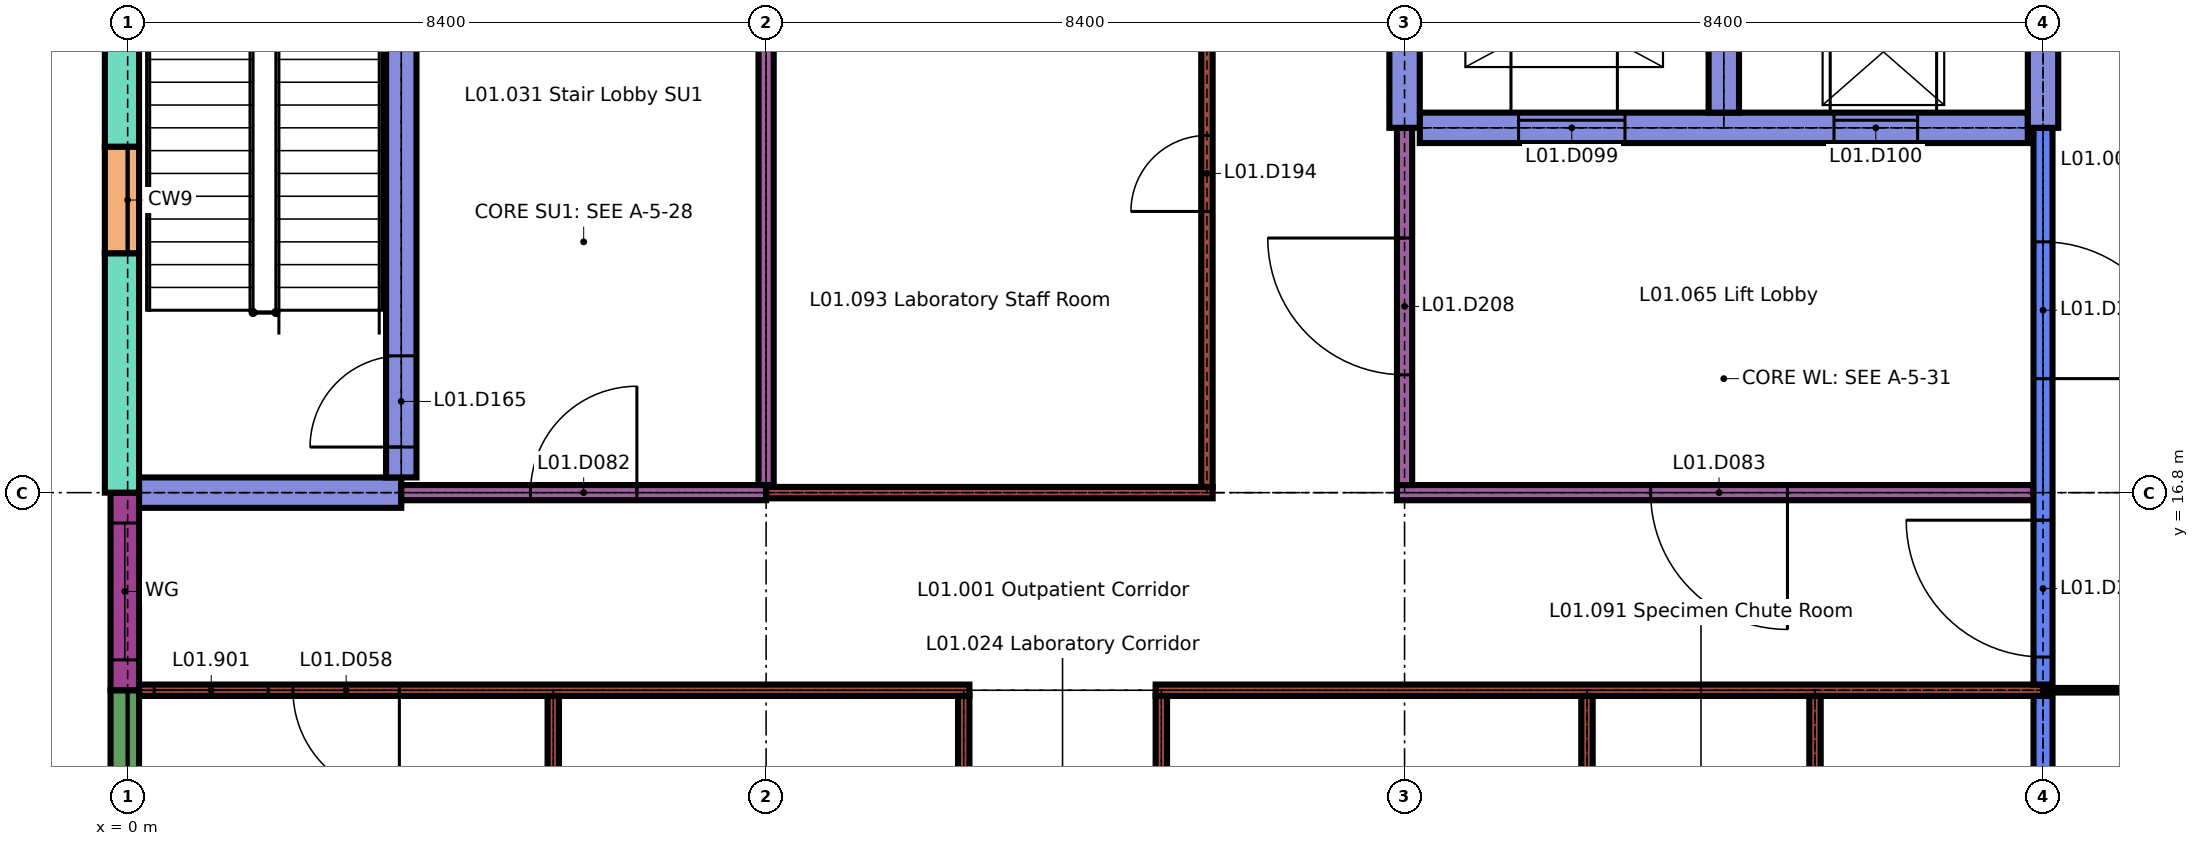
"""IFC4 building model, lengths in metres.
Left out: names, types, materials, properties, quantities, classifications, styles, units other than length and angle.
Written with IfcOpenShell. Run it as: python <this file> out.ifc"""

import sys

from ifc_helpers import new_model, si_unit, direction, frame, frame_2d, origin, place, context, subcontext, project, spatial, rectangle, extrude, element, fill, save


model = new_model("IFC4")
c1 = context("Model", 3, precision=1e-05, world=origin(), true_north=direction((0.0, 1.0)))
c2 = subcontext(c1, "Body", "Model", "MODEL_VIEW")
j1 = project(units=[si_unit("LENGTHUNIT", "METRE"), si_unit("PLANEANGLEUNIT", "RADIAN")], contexts=[c1])
p1 = place(None, origin())
s1 = spatial("IfcSite", under=j1, at=p1, CompositionType="ELEMENT")
p2 = place(p1, origin())
s2 = spatial("IfcBuilding", under=s1, at=p2, CompositionType="ELEMENT")
p3 = place(p2, frame((0.0, 0.0, 4.5)))
s3 = spatial("IfcBuildingStorey", under=s2, at=p3, CompositionType="ELEMENT", Elevation=4.5)
p4 = place(p3, frame((-0.038, 8.825, 0.0), z_axis=(0.0, 0.0, 1.0), x_axis=(0.0, 1.0, 0.0)))
e1 = element("IfcWall", 1, at=p4, inside=s3, PredefinedType="SOLIDWALL", context=c2, shape_type="SweptSolid", body=[
    extrude(rectangle(XDim=5.375, YDim=0.375, at=frame_2d((2.688, 0.0))), origin(), (0.0, 0.0, 1.0), 0.45),
])
p5 = place(p3, frame((-0.038, 14.2, 0.0), z_axis=(0.0, 0.0, 1.0), x_axis=(0.0, 1.0, 0.0)))
e2 = element("IfcWall", 2, at=p5, inside=s3, PredefinedType="SOLIDWALL", context=c2, shape_type="SweptSolid", body=[
    extrude(rectangle(XDim=2.6, YDim=0.375, at=frame_2d((1.3, 0.0))), origin(), (0.0, 0.0, 1.0), 3.15),
])
p6 = place(p5, frame((0.4, 0.0, 0.9)))
e3 = element("IfcOpeningElement", 3, at=p6, cuts=e2, PredefinedType="OPENING", context=c2, shape_type="SweptSolid", body=[
    extrude(rectangle(XDim=1.8, YDim=1.5, at=frame_2d((0.9, 0.75))), frame((0.0, 0.198, 0.0), z_axis=(0.0, -1.0, 0.0), x_axis=(1.0, 0.0, 0.0)), (0.0, 0.0, 1.0), 0.395),
])
p7 = place(p3, frame((-0.075, 16.8, 0.0), z_axis=(0.0, 0.0, 1.0), x_axis=(0.0, 1.0, 0.0)))
e4 = element("IfcWall", 4, at=p7, inside=s3, PredefinedType="SOLIDWALL", context=c2, shape_type="SweptSolid", body=[
    extrude(rectangle(XDim=3.15, YDim=0.45, at=frame_2d((1.575, 0.0))), origin(), (0.0, 0.0, 1.0), 3.45),
])
p8 = place(p3, frame((-0.075, 21.35, 0.0), z_axis=(0.0, 0.0, 1.0), x_axis=(0.0, 1.0, 0.0)))
e5 = element("IfcWall", 5, at=p8, inside=s3, PredefinedType="SOLIDWALL", context=c2, shape_type="SweptSolid", body=[
    extrude(rectangle(XDim=3.85, YDim=0.45, at=frame_2d((1.925, 0.0))), origin(), (0.0, 0.0, 1.0), 3.45),
])
p9 = place(p3, frame((-0.075, 19.95, 0.0), z_axis=(0.0, 0.0, 1.0), x_axis=(0.0, 1.0, 0.0)))
e6 = element("IfcWall", 6, at=p9, inside=s3, PredefinedType="SOLIDWALL", context=c2, shape_type="SweptSolid", body=[
    extrude(rectangle(XDim=1.4, YDim=0.45, at=frame_2d((0.7, 0.0))), origin(), (0.0, 0.0, 1.0), 0.6),
])
p10 = place(p3, frame((0.15, 14.2, 0.0), z_axis=(0.0, 0.0, 1.0), x_axis=(1.0, 0.0, 0.0)))
e7 = element("IfcWall", 7, at=p10, inside=s3, PredefinedType="PARTITIONING", context=c2, shape_type="SweptSolid", body=[
    extrude(rectangle(XDim=10.925, YDim=0.15, at=frame_2d((5.462, 0.0))), origin(), (0.0, 0.0, 1.0), 3.45),
])
p11 = place(p10, frame((2.025, 0.0, 0.0)))
e8 = element("IfcOpeningElement", 8, at=p11, cuts=e7, PredefinedType="OPENING", context=c2, shape_type="SweptSolid", body=[
    extrude(rectangle(XDim=1.4, YDim=2.1, at=frame_2d((0.7, 1.05))), frame((0.0, 0.085, 0.0), z_axis=(0.0, -1.0, 0.0), x_axis=(1.0, 0.0, 0.0)), (0.0, 0.0, 1.0), 0.17),
])
p12 = place(p10, frame((0.2, 0.0, 0.9)))
e9 = element("IfcOpeningElement", 9, at=p12, cuts=e7, PredefinedType="OPENING", context=c2, shape_type="SweptSolid", body=[
    extrude(rectangle(XDim=1.5, YDim=1.0, at=frame_2d((0.75, 0.5))), frame((0.0, 0.085, 0.0), z_axis=(0.0, -1.0, 0.0), x_axis=(1.0, 0.0, 0.0)), (0.0, 0.0, 1.0), 0.17),
])
p13 = place(p3, frame((13.525, 14.2, 0.0), z_axis=(0.0, 0.0, 1.0), x_axis=(1.0, 0.0, 0.0)))
e10 = element("IfcWall", 10, at=p13, inside=s3, PredefinedType="PARTITIONING", context=c2, shape_type="SweptSolid", body=[
    extrude(rectangle(XDim=11.675, YDim=0.15, at=frame_2d((5.837, 0.0))), origin(), (0.0, 0.0, 1.0), 3.45),
])
p14 = place(p3, frame((25.2, 14.2, 0.0), z_axis=(0.0, 0.0, 1.0), x_axis=(1.0, 0.0, 0.0)))
e11 = element("IfcWall", 11, at=p14, inside=s3, PredefinedType="PARTITIONING", context=c2, shape_type="SweptSolid", body=[
    extrude(rectangle(XDim=8.4, YDim=0.06, at=frame_2d((4.2, 0.0))), origin(), (0.0, 0.0, 1.0), 3.45),
])
p15 = place(p14, frame((3.5, 0.0, 0.0)))
e12 = element("IfcOpeningElement", 12, at=p15, cuts=e11, PredefinedType="OPENING", context=c2, shape_type="SweptSolid", body=[
    extrude(rectangle(XDim=1.4, YDim=2.1, at=frame_2d((0.7, 1.05))), frame((0.0, 0.04, 0.0), z_axis=(0.0, -1.0, 0.0), x_axis=(1.0, 0.0, 0.0)), (0.0, 0.0, 1.0), 0.08),
])
p16 = place(p14, frame((1.4, 0.0, 0.9)))
e13 = element("IfcOpeningElement", 13, at=p16, cuts=e11, PredefinedType="OPENING", context=c2, shape_type="SweptSolid", body=[
    extrude(rectangle(XDim=1.8, YDim=1.0, at=frame_2d((0.9, 0.5))), frame((0.0, 0.04, 0.0), z_axis=(0.0, -1.0, 0.0), x_axis=(1.0, 0.0, 0.0)), (0.0, 0.0, 1.0), 0.08),
])
p17 = place(p3, frame((0.15, 16.8, 0.0), z_axis=(0.0, 0.0, 1.0), x_axis=(1.0, 0.0, 0.0)))
e14 = element("IfcWall", 14, at=p17, inside=s3, PredefinedType="SHEAR", context=c2, shape_type="SweptSolid", body=[
    extrude(rectangle(XDim=3.45, YDim=0.4, at=frame_2d((1.725, 0.0))), origin(), (0.0, 0.0, 1.0), 3.45),
])
p18 = place(p3, frame((3.6, 16.8, 0.0), z_axis=(0.0, 0.0, 1.0), x_axis=(1.0, 0.0, 0.0)))
e15 = element("IfcWall", 15, at=p18, inside=s3, PredefinedType="PARTITIONING", context=c2, shape_type="SweptSolid", body=[
    extrude(rectangle(XDim=4.8, YDim=0.2, at=frame_2d((2.4, 0.0))), origin(), (0.0, 0.0, 1.0), 3.45),
])
p19 = place(p18, frame((1.7, 0.0, 0.0)))
e16 = element("IfcOpeningElement", 16, at=p19, cuts=e15, PredefinedType="OPENING", context=c2, shape_type="SweptSolid", body=[
    extrude(rectangle(XDim=1.4, YDim=2.1, at=frame_2d((0.7, 1.05))), frame((0.0, 0.11, 0.0), z_axis=(0.0, -1.0, 0.0), x_axis=(1.0, 0.0, 0.0)), (0.0, 0.0, 1.0), 0.22),
])
p20 = place(p3, frame((8.4, 16.8, 0.0), z_axis=(0.0, 0.0, 1.0), x_axis=(1.0, 0.0, 0.0)))
e17 = element("IfcWall", 17, at=p20, inside=s3, PredefinedType="PARTITIONING", context=c2, shape_type="SweptSolid", body=[
    extrude(rectangle(XDim=5.875, YDim=0.15, at=frame_2d((2.938, 0.0))), origin(), (0.0, 0.0, 1.0), 3.45),
])
p21 = place(p3, frame((16.7, 16.8, 0.0), z_axis=(0.0, 0.0, 1.0), x_axis=(1.0, 0.0, 0.0)))
e18 = element("IfcWall", 18, at=p21, inside=s3, PredefinedType="PARTITIONING", context=c2, shape_type="SweptSolid", body=[
    extrude(rectangle(XDim=8.375, YDim=0.2, at=frame_2d((4.188, 0.0))), origin(), (0.0, 0.0, 1.0), 3.45),
])
p22 = place(p21, frame((3.337, 0.0, 0.0)))
e19 = element("IfcOpeningElement", 19, at=p22, cuts=e18, PredefinedType="OPENING", context=c2, shape_type="SweptSolid", body=[
    extrude(rectangle(XDim=1.8, YDim=2.4, at=frame_2d((0.9, 1.2))), frame((0.0, 0.11, 0.0), z_axis=(0.0, -1.0, 0.0), x_axis=(1.0, 0.0, 0.0)), (0.0, 0.0, 1.0), 0.22),
])
p23 = place(p3, frame((17.0, 21.6, 0.0), z_axis=(0.0, 0.0, 1.0), x_axis=(1.0, 0.0, 0.0)))
e20 = element("IfcWall", 20, at=p23, inside=s3, PredefinedType="SHEAR", context=c2, shape_type="SweptSolid", body=[
    extrude(rectangle(XDim=8.0, YDim=0.4, at=frame_2d((4.0, 0.0))), origin(), (0.0, 0.0, 1.0), 3.45),
])
p24 = place(p23, frame((1.3, 0.0, 0.0)))
e21 = element("IfcOpeningElement", 21, at=p24, cuts=e20, PredefinedType="OPENING", context=c2, shape_type="SweptSolid", body=[
    extrude(rectangle(XDim=1.4, YDim=2.1, at=frame_2d((0.7, 1.05))), frame((0.0, 0.21, 0.0), z_axis=(0.0, -1.0, 0.0), x_axis=(1.0, 0.0, 0.0)), (0.0, 0.0, 1.0), 0.42),
])
p25 = place(p23, frame((5.45, 0.0, 0.0)))
e22 = element("IfcOpeningElement", 22, at=p25, cuts=e20, PredefinedType="OPENING", context=c2, shape_type="SweptSolid", body=[
    extrude(rectangle(XDim=1.1, YDim=2.1, at=frame_2d((0.55, 1.05))), frame((0.0, 0.21, 0.0), z_axis=(0.0, -1.0, 0.0), x_axis=(1.0, 0.0, 0.0)), (0.0, 0.0, 1.0), 0.42),
])
p26 = place(p3, frame((3.6, 17.0, 0.0), z_axis=(0.0, 0.0, 1.0), x_axis=(0.0, 1.0, 0.0)))
e23 = element("IfcWall", 23, at=p26, inside=s3, PredefinedType="SHEAR", context=c2, shape_type="SweptSolid", body=[
    extrude(rectangle(XDim=8.0, YDim=0.4, at=frame_2d((4.0, 0.0))), origin(), (0.0, 0.0, 1.0), 3.45),
])
p27 = place(p26, frame((0.4, 0.0, 0.0)))
e24 = element("IfcOpeningElement", 24, at=p27, cuts=e23, PredefinedType="OPENING", context=c2, shape_type="SweptSolid", body=[
    extrude(rectangle(XDim=1.2, YDim=2.1, at=frame_2d((0.6, 1.05))), frame((0.0, 0.21, 0.0), z_axis=(0.0, -1.0, 0.0), x_axis=(1.0, 0.0, 0.0)), (0.0, 0.0, 1.0), 0.42),
])
p28 = place(p3, frame((5.6, 8.675, 0.0), z_axis=(0.0, 0.0, 1.0), x_axis=(0.0, 1.0, 0.0)))
e25 = element("IfcWall", 25, at=p28, inside=s3, PredefinedType="PARTITIONING", context=c2, shape_type="SweptSolid", body=[
    extrude(rectangle(XDim=5.45, YDim=0.15, at=frame_2d((2.725, 0.0))), origin(), (0.0, 0.0, 1.0), 3.45),
])
p29 = place(p3, frame((8.4, 16.9, 0.0), z_axis=(0.0, 0.0, 1.0), x_axis=(0.0, 1.0, 0.0)))
e26 = element("IfcWall", 26, at=p29, inside=s3, PredefinedType="PARTITIONING", context=c2, shape_type="SweptSolid", body=[
    extrude(rectangle(XDim=8.2, YDim=0.2, at=frame_2d((4.1, 0.0))), origin(), (0.0, 0.0, 1.0), 3.45),
])
p30 = place(p3, frame((11.0, 8.675, 0.0), z_axis=(0.0, 0.0, 1.0), x_axis=(0.0, 1.0, 0.0)))
e27 = element("IfcWall", 27, at=p30, inside=s3, PredefinedType="PARTITIONING", context=c2, shape_type="SweptSolid", body=[
    extrude(rectangle(XDim=5.45, YDim=0.15, at=frame_2d((2.725, 0.0))), origin(), (0.0, 0.0, 1.0), 3.45),
])
p31 = place(p3, frame((13.6, 8.675, 0.0), z_axis=(0.0, 0.0, 1.0), x_axis=(0.0, 1.0, 0.0)))
e28 = element("IfcWall", 28, at=p31, inside=s3, PredefinedType="PARTITIONING", context=c2, shape_type="SweptSolid", body=[
    extrude(rectangle(XDim=5.45, YDim=0.15, at=frame_2d((2.725, 0.0))), origin(), (0.0, 0.0, 1.0), 3.45),
])
p32 = place(p31, frame((2.425, 0.0, 0.9)))
e29 = element("IfcOpeningElement", 29, at=p32, cuts=e28, PredefinedType="OPENING", context=c2, shape_type="SweptSolid", body=[
    extrude(rectangle(XDim=0.6, YDim=0.6, at=frame_2d((0.3, 0.3))), frame((0.0, 0.085, 0.0), z_axis=(0.0, -1.0, 0.0), x_axis=(1.0, 0.0, 0.0)), (0.0, 0.0, 1.0), 0.17),
])
p33 = place(p3, frame((14.2, 16.875, 0.0), z_axis=(0.0, 0.0, 1.0), x_axis=(0.0, 1.0, 0.0)))
e30 = element("IfcWall", 30, at=p33, inside=s3, PredefinedType="PARTITIONING", context=c2, shape_type="SweptSolid", body=[
    extrude(rectangle(XDim=8.25, YDim=0.15, at=frame_2d((4.125, 0.0))), origin(), (0.0, 0.0, 1.0), 3.45),
])
p34 = place(p33, frame((3.625, 0.0, 0.0)))
e31 = element("IfcOpeningElement", 31, at=p34, cuts=e30, PredefinedType="OPENING", context=c2, shape_type="SweptSolid", body=[
    extrude(rectangle(XDim=1.0, YDim=2.1, at=frame_2d((0.5, 1.05))), frame((0.0, 0.085, 0.0), z_axis=(0.0, -1.0, 0.0), x_axis=(1.0, 0.0, 0.0)), (0.0, 0.0, 1.0), 0.17),
])
p35 = place(p3, frame((16.8, 16.9, 0.0), z_axis=(0.0, 0.0, 1.0), x_axis=(0.0, 1.0, 0.0)))
e32 = element("IfcWall", 32, at=p35, inside=s3, PredefinedType="PARTITIONING", context=c2, shape_type="SweptSolid", body=[
    extrude(rectangle(XDim=4.7, YDim=0.2, at=frame_2d((2.35, 0.0))), origin(), (0.0, 0.0, 1.0), 3.45),
])
p36 = place(p35, frame((1.45, 0.0, 0.0)))
e33 = element("IfcOpeningElement", 33, at=p36, cuts=e32, PredefinedType="OPENING", context=c2, shape_type="SweptSolid", body=[
    extrude(rectangle(XDim=1.8, YDim=2.4, at=frame_2d((0.9, 1.2))), frame((0.0, 0.11, 0.0), z_axis=(0.0, -1.0, 0.0), x_axis=(1.0, 0.0, 0.0)), (0.0, 0.0, 1.0), 0.22),
])
p37 = place(p3, frame((16.8, 21.6, 0.0), z_axis=(0.0, 0.0, 1.0), x_axis=(0.0, 1.0, 0.0)))
e34 = element("IfcWall", 34, at=p37, inside=s3, PredefinedType="SHEAR", context=c2, shape_type="SweptSolid", body=[
    extrude(rectangle(XDim=3.6, YDim=0.4, at=frame_2d((1.8, 0.0))), origin(), (0.0, 0.0, 1.0), 3.45),
])
p38 = place(p3, frame((19.2, 8.675, 0.0), z_axis=(0.0, 0.0, 1.0), x_axis=(0.0, 1.0, 0.0)))
e35 = element("IfcWall", 35, at=p38, inside=s3, PredefinedType="PARTITIONING", context=c2, shape_type="SweptSolid", body=[
    extrude(rectangle(XDim=5.45, YDim=0.15, at=frame_2d((2.725, 0.0))), origin(), (0.0, 0.0, 1.0), 3.45),
])
p39 = place(p3, frame((21.0, 21.8, 0.0), z_axis=(0.0, 0.0, 1.0), x_axis=(0.0, 1.0, 0.0)))
e36 = element("IfcWall", 36, at=p39, inside=s3, PredefinedType="SHEAR", context=c2, shape_type="SweptSolid", body=[
    extrude(rectangle(XDim=3.2, YDim=0.4, at=frame_2d((1.6, 0.0))), origin(), (0.0, 0.0, 1.0), 3.45),
])
p40 = place(p3, frame((22.2, 8.675, 0.0), z_axis=(0.0, 0.0, 1.0), x_axis=(0.0, 1.0, 0.0)))
e37 = element("IfcWall", 37, at=p40, inside=s3, PredefinedType="PARTITIONING", context=c2, shape_type="SweptSolid", body=[
    extrude(rectangle(XDim=5.45, YDim=0.15, at=frame_2d((2.725, 0.0))), origin(), (0.0, 0.0, 1.0), 3.45),
])
p41 = place(p3, frame((25.2, 8.825, 0.0), z_axis=(0.0, 0.0, 1.0), x_axis=(0.0, 1.0, 0.0)))
e38 = element("IfcWall", 38, at=p41, inside=s3, PredefinedType="SOLIDWALL", context=c2, shape_type="SweptSolid", body=[
    extrude(rectangle(XDim=5.3, YDim=0.25, at=frame_2d((2.65, 0.0))), origin(), (0.0, 0.0, 1.0), 3.45),
])
p42 = place(p3, frame((25.2, 14.275, 0.0), z_axis=(0.0, 0.0, 1.0), x_axis=(0.0, 1.0, 0.0)))
e39 = element("IfcWall", 39, at=p42, inside=s3, PredefinedType="SOLIDWALL", context=c2, shape_type="SweptSolid", body=[
    extrude(rectangle(XDim=7.325, YDim=0.25, at=frame_2d((3.663, 0.0))), origin(), (0.0, 0.0, 1.0), 3.45),
])
p43 = place(p42, frame((0.363, 0.0, 0.0)))
e40 = element("IfcOpeningElement", 40, at=p43, cuts=e39, PredefinedType="OPENING", context=c2, shape_type="SweptSolid", body=[
    extrude(rectangle(XDim=1.8, YDim=2.4, at=frame_2d((0.9, 1.2))), frame((0.0, 0.135, 0.0), z_axis=(0.0, -1.0, 0.0), x_axis=(1.0, 0.0, 0.0)), (0.0, 0.0, 1.0), 0.27),
])
p44 = place(p42, frame((4.025, 0.0, 0.0)))
e41 = element("IfcOpeningElement", 41, at=p44, cuts=e39, PredefinedType="OPENING", context=c2, shape_type="SweptSolid", body=[
    extrude(rectangle(XDim=1.8, YDim=2.4, at=frame_2d((0.9, 1.2))), frame((0.0, 0.135, 0.0), z_axis=(0.0, -1.0, 0.0), x_axis=(1.0, 0.0, 0.0)), (0.0, 0.0, 1.0), 0.27),
])
p45 = place(p3, frame((25.2, 21.6, 0.0), z_axis=(0.0, 0.0, 1.0), x_axis=(0.0, 1.0, 0.0)))
e42 = element("IfcWall", 42, at=p45, inside=s3, PredefinedType="SHEAR", context=c2, shape_type="SweptSolid", body=[
    extrude(rectangle(XDim=3.6, YDim=0.4, at=frame_2d((1.8, 0.0))), origin(), (0.0, 0.0, 1.0), 3.45),
])
p46 = place(p6, origin())
e43 = element("IfcWindow", 43, at=p46, inside=s3, PartitioningType="DOUBLE_PANEL_VERTICAL", PredefinedType="WINDOW", context=c2, shape_type="SweptSolid", body=[
    extrude(rectangle(XDim=1.8, YDim=1.5, at=frame_2d((0.9, 0.75))), frame((0.0, 0.03, 0.0), z_axis=(0.0, -1.0, 0.0), x_axis=(1.0, 0.0, 0.0)), (0.0, 0.0, 1.0), 0.06),
])
fill(e3, e43)
p47 = place(p11, origin())
e44 = element("IfcDoor", 44, at=p47, inside=s3, OperationType="SINGLE_SWING_RIGHT", PredefinedType="DOOR", context=c2, shape_type="SweptSolid", body=[
    extrude(rectangle(XDim=1.4, YDim=2.1, at=frame_2d((0.7, 1.05))), frame((0.0, 0.025, 0.0), z_axis=(0.0, -1.0, 0.0), x_axis=(1.0, 0.0, 0.0)), (0.0, 0.0, 1.0), 0.05),
])
fill(e8, e44)
p48 = place(p19, origin())
e45 = element("IfcDoor", 45, at=p48, inside=s3, OperationType="SINGLE_SWING_LEFT", PredefinedType="DOOR", context=c2, shape_type="SweptSolid", body=[
    extrude(rectangle(XDim=1.4, YDim=2.1, at=frame_2d((0.7, 1.05))), frame((0.0, 0.03, 0.0), z_axis=(0.0, -1.0, 0.0), x_axis=(1.0, 0.0, 0.0)), (0.0, 0.0, 1.0), 0.06),
])
fill(e16, e45)
p49 = place(p22, origin())
e46 = element("IfcDoor", 46, at=p49, inside=s3, OperationType="SINGLE_SWING_RIGHT", PredefinedType="DOOR", context=c2, shape_type="SweptSolid", body=[
    extrude(rectangle(XDim=1.8, YDim=2.4, at=frame_2d((0.9, 1.2))), frame((0.0, 0.03, 0.0), z_axis=(0.0, -1.0, 0.0), x_axis=(1.0, 0.0, 0.0)), (0.0, 0.0, 1.0), 0.06),
])
fill(e19, e46)
p50 = place(p24, origin())
e47 = element("IfcDoor", 47, at=p50, inside=s3, OperationType="SLIDING_TO_LEFT", PredefinedType="DOOR", context=c2, shape_type="SweptSolid", body=[
    extrude(rectangle(XDim=1.4, YDim=2.1, at=frame_2d((0.7, 1.05))), frame((0.0, 0.025, 0.0), z_axis=(0.0, -1.0, 0.0), x_axis=(1.0, 0.0, 0.0)), (0.0, 0.0, 1.0), 0.05),
])
fill(e21, e47)
p51 = place(p25, origin())
e48 = element("IfcDoor", 48, at=p51, inside=s3, OperationType="SLIDING_TO_LEFT", PredefinedType="DOOR", context=c2, shape_type="SweptSolid", body=[
    extrude(rectangle(XDim=1.1, YDim=2.1, at=frame_2d((0.55, 1.05))), frame((0.0, 0.025, 0.0), z_axis=(0.0, -1.0, 0.0), x_axis=(1.0, 0.0, 0.0)), (0.0, 0.0, 1.0), 0.05),
])
fill(e22, e48)
p52 = place(p27, origin())
e49 = element("IfcDoor", 49, at=p52, inside=s3, OperationType="SINGLE_SWING_RIGHT", PredefinedType="DOOR", context=c2, shape_type="SweptSolid", body=[
    extrude(rectangle(XDim=1.2, YDim=2.1, at=frame_2d((0.6, 1.05))), frame((0.0, 0.025, 0.0), z_axis=(0.0, -1.0, 0.0), x_axis=(1.0, 0.0, 0.0)), (0.0, 0.0, 1.0), 0.05),
])
fill(e24, e49)
p53 = place(p34, origin())
e50 = element("IfcDoor", 50, at=p53, inside=s3, OperationType="SINGLE_SWING_RIGHT", PredefinedType="DOOR", context=c2, shape_type="SweptSolid", body=[
    extrude(rectangle(XDim=1.0, YDim=2.1, at=frame_2d((0.5, 1.05))), frame((0.0, 0.025, 0.0), z_axis=(0.0, -1.0, 0.0), x_axis=(1.0, 0.0, 0.0)), (0.0, 0.0, 1.0), 0.05),
])
fill(e31, e50)
p54 = place(p36, origin())
e51 = element("IfcDoor", 51, at=p54, inside=s3, OperationType="SINGLE_SWING_LEFT", PredefinedType="DOOR", context=c2, shape_type="SweptSolid", body=[
    extrude(rectangle(XDim=1.8, YDim=2.4, at=frame_2d((0.9, 1.2))), frame((0.0, 0.03, 0.0), z_axis=(0.0, -1.0, 0.0), x_axis=(1.0, 0.0, 0.0)), (0.0, 0.0, 1.0), 0.06),
])
fill(e33, e51)
p55 = place(p43, origin())
e52 = element("IfcDoor", 52, at=p55, inside=s3, OperationType="SINGLE_SWING_LEFT", PredefinedType="DOOR", context=c2, shape_type="SweptSolid", body=[
    extrude(rectangle(XDim=1.8, YDim=2.4, at=frame_2d((0.9, 1.2))), frame((0.0, 0.03, 0.0), z_axis=(0.0, -1.0, 0.0), x_axis=(1.0, 0.0, 0.0)), (0.0, 0.0, 1.0), 0.06),
])
fill(e40, e52)
p56 = place(p44, origin())
e53 = element("IfcDoor", 53, at=p56, inside=s3, OperationType="SINGLE_SWING_LEFT", PredefinedType="DOOR", context=c2, shape_type="SweptSolid", body=[
    extrude(rectangle(XDim=1.8, YDim=2.4, at=frame_2d((0.9, 1.2))), frame((0.0, 0.03, 0.0), z_axis=(0.0, -1.0, 0.0), x_axis=(1.0, 0.0, 0.0)), (0.0, 0.0, 1.0), 0.06),
])
fill(e41, e53)
p57 = place(p12, origin())
e54 = element("IfcWindow", 54, at=p57, inside=s3, PartitioningType="DOUBLE_PANEL_HORIZONTAL", PredefinedType="WINDOW", context=c2, shape_type="SweptSolid", body=[
    extrude(rectangle(XDim=1.5, YDim=1.0, at=frame_2d((0.75, 0.5))), frame((0.0, 0.025, 0.0), z_axis=(0.0, -1.0, 0.0), x_axis=(1.0, 0.0, 0.0)), (0.0, 0.0, 1.0), 0.05),
])
fill(e9, e54)
save(model, sys.argv[1])
